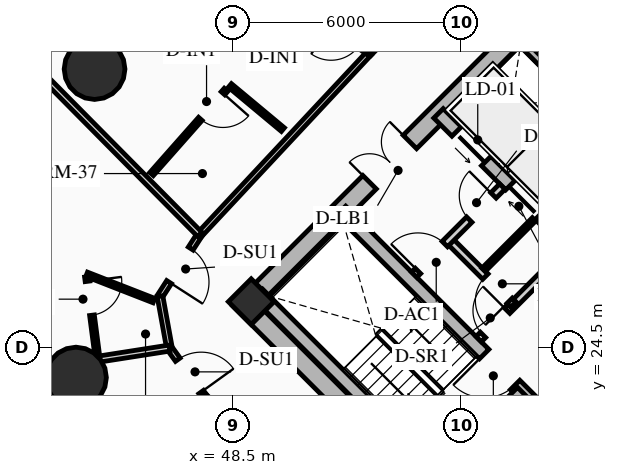
"""IFC4 building model, lengths in metres.
Left out: names, types, materials, properties, quantities, classifications, styles, units other than length and angle.
Written with IfcOpenShell. Run it as: python <this file> out.ifc"""

import sys

from ifc_helpers import new_model, si_unit, direction, frame, frame_2d, origin, origin_2d, place, context, subcontext, project, spatial, rectangle, circle, extrude, source, transform, mapped, element, fill, save


model = new_model("IFC4")
c1 = context("Model", 3, precision=1e-05, world=origin(), true_north=direction((0.0, 1.0)))
c2 = subcontext(c1, "Body", "Model", "MODEL_VIEW")
j1 = project(units=[si_unit("LENGTHUNIT", "METRE"), si_unit("PLANEANGLEUNIT", "RADIAN")], contexts=[c1])
p1 = place(None, origin())
s1 = spatial("IfcSite", under=j1, at=p1, CompositionType="ELEMENT")
p2 = place(p1, origin())
s2 = spatial("IfcBuilding", under=s1, at=p2, CompositionType="ELEMENT")
p3 = place(p2, frame((0.0, 0.0, 51.1)))
s3 = spatial("IfcBuildingStorey", under=s2, at=p3, CompositionType="ELEMENT", Elevation=51.1)
for number, where, z_axis, x_axis in (
    (1, (58.773, 15.661, 0.0), (0.0, 0.0, 1.0), (-0.707, 0.707, 0.0)),
    (2, (66.339, 23.227, 0.0), (0.0, 0.0, 1.0), (-0.707, 0.707, 0.0)),
):
    element("IfcWall", number, at=place(p3, frame(where, z_axis=z_axis, x_axis=x_axis)), inside=s3, PredefinedType="SHEAR", context=c2, shape_type="SweptSolid", body=[
        extrude(rectangle(XDim=14.3, YDim=0.5, at=frame_2d((7.15, 0.0))), origin(), (0.0, 0.0, 1.0), 2.91),
    ])
p4 = place(p3, frame((48.838, 25.596, 0.0), z_axis=(0.0, 0.0, 1.0), x_axis=(0.707106781187, 0.707106781187, 0.0)))
e3 = element("IfcWall", 3, at=p4, inside=s3, PredefinedType="SHEAR", context=c2, shape_type="SweptSolid", body=[
    extrude(rectangle(XDim=10.7, YDim=0.5, at=frame_2d((5.35, 0.0))), origin(), (0.0, 0.0, 1.0), 2.91),
])
m1 = source(origin(), c2, "Body", "SweptSolid", [
    extrude(rectangle(XDim=1.5, YDim=2.02, at=frame_2d((0.75, 1.01))), frame((0.0, 0.26, 0.0), z_axis=(0.0, -1.0, 0.0), x_axis=(1.0, 0.0, 0.0)), (0.0, 0.0, 1.0), 0.52),
])
p5 = place(p4, frame((4.6, 0.0, 0.0)))
e4 = element("IfcOpeningElement", 4, at=p5, cuts=e3, PredefinedType="OPENING", context=c2, shape_type="MappedRepresentation", body=[
    mapped(m1, transform((0.0, 0.0, 0.0), x_axis=(1.0, 0.0, 0.0), y_axis=(0.0, 1.0, 0.0), z_axis=(0.0, 0.0, 1.0), scale=1.0)),
])
p6 = place(p3, frame((61.096, 18.338, 0.0), z_axis=(0.0, 0.0, 1.0), x_axis=(-0.707106781187, 0.707106781187, 0.0)))
e5 = element("IfcWall", 5, at=p6, inside=s3, PredefinedType="SHEAR", context=c2, shape_type="SweptSolid", body=[
    extrude(rectangle(XDim=13.8, YDim=0.35, at=frame_2d((6.9, 0.0))), origin(), (0.0, 0.0, 1.0), 2.91),
])
m2 = source(origin(), c2, "Body", "SweptSolid", [
    extrude(rectangle(XDim=1.1, YDim=2.015, at=frame_2d((0.55, 1.007))), frame((0.0, 0.185, 0.0), z_axis=(0.0, -1.0, 0.0), x_axis=(1.0, 0.0, 0.0)), (0.0, 0.0, 1.0), 0.37),
])
p7 = place(p6, frame((4.9, 0.0, 0.0)))
e6 = element("IfcOpeningElement", 6, at=p7, cuts=e5, PredefinedType="OPENING", context=c2, shape_type="MappedRepresentation", body=[
    mapped(m2, transform((0.0, 0.0, 0.0), x_axis=(1.0, 0.0, 0.0), y_axis=(0.0, 1.0, 0.0), z_axis=(0.0, 0.0, 1.0), scale=1.0)),
])
m3 = source(origin(), c2, "Body", "SweptSolid", [
    extrude(rectangle(XDim=1.15, YDim=2.02, at=frame_2d((0.575, 1.01))), frame((0.0, 0.185, 0.0), z_axis=(0.0, -1.0, 0.0), x_axis=(1.0, 0.0, 0.0)), (0.0, 0.0, 1.0), 0.37),
])
p8 = place(p6, frame((7.32, 0.0, 0.0)))
e7 = element("IfcOpeningElement", 7, at=p8, cuts=e5, PredefinedType="OPENING", context=c2, shape_type="MappedRepresentation", body=[
    mapped(m3, transform((0.0, 0.0, 0.0), x_axis=(1.0, 0.0, 0.0), y_axis=(0.0, 1.0, 0.0), z_axis=(0.0, 0.0, 1.0), scale=1.0)),
])
p9 = place(p3, frame((63.662, 20.904, 0.0), z_axis=(0.0, 0.0, 1.0), x_axis=(-0.707106781187, 0.707106781187, 0.0)))
e8 = element("IfcWall", 8, at=p9, inside=s3, PredefinedType="SHEAR", context=c2, shape_type="SweptSolid", body=[
    extrude(rectangle(XDim=13.8, YDim=0.35, at=frame_2d((6.9, 0.0))), origin(), (0.0, 0.0, 1.0), 2.91),
])
p10 = place(p9, frame((10.025, 0.0, 0.0)))
e9 = element("IfcOpeningElement", 9, at=p10, cuts=e8, PredefinedType="OPENING", context=c2, shape_type="MappedRepresentation", body=[
    mapped(m2, transform((0.0, 0.0, 0.0), x_axis=(1.0, 0.0, 0.0), y_axis=(0.0, 1.0, 0.0), z_axis=(0.0, 0.0, 1.0), scale=1.0)),
])
p11 = place(p9, frame((12.025, 0.0, 0.0)))
e10 = element("IfcOpeningElement", 10, at=p11, cuts=e8, PredefinedType="OPENING", context=c2, shape_type="MappedRepresentation", body=[
    mapped(m2, transform((0.0, 0.0, 0.0), x_axis=(1.0, 0.0, 0.0), y_axis=(0.0, 1.0, 0.0), z_axis=(0.0, 0.0, 1.0), scale=1.0)),
])
p12 = place(p9, frame((5.33, 0.0, 0.0)))
e11 = element("IfcOpeningElement", 11, at=p12, cuts=e8, PredefinedType="OPENING", context=c2, shape_type="MappedRepresentation", body=[
    mapped(m3, transform((0.0, 0.0, 0.0), x_axis=(1.0, 0.0, 0.0), y_axis=(0.0, 1.0, 0.0), z_axis=(0.0, 0.0, 1.0), scale=1.0)),
])
p13 = place(p3, frame((53.922, 21.141, 0.0), z_axis=(0.0, 0.0, 1.0), x_axis=(-0.707106781187, 0.707106781187, 0.0)))
e12 = element("IfcWall", 12, at=p13, inside=s3, PredefinedType="SHEAR", context=c2, shape_type="SweptSolid", body=[
    extrude(rectangle(XDim=6.745, YDim=0.35, at=frame_2d((3.373, 0.0))), origin(), (0.0, 0.0, 1.0), 2.91),
])
p14 = place(p3, frame((53.784, 21.003, 0.0), z_axis=(0.0, 0.0, 1.0), x_axis=(0.707106781187, 0.707106781187, 0.0)))
e13 = element("IfcWall", 13, at=p14, inside=s3, PredefinedType="SHEAR", context=c2, shape_type="SweptSolid", body=[
    extrude(rectangle(XDim=3.285, YDim=0.35, at=frame_2d((1.643, 0.0))), origin(), (0.0, 0.0, 1.0), 2.91),
])
p15 = place(p3, frame((48.976, 25.706, 0.0), z_axis=(0.0, 0.0, 1.0), x_axis=(0.707106781187, 0.707106781187, 0.0)))
e14 = element("IfcColumn", 14, at=p15, inside=s3, PredefinedType="COLUMN", context=c2, shape_type="SweptSolid", body=[
    extrude(rectangle(XDim=0.85, YDim=0.85, at=origin_2d()), origin(), (0.0, 0.0, 1.0), 2.91),
])
for number, where, z_axis, x_axis in (
    (15, (44.854, 31.827, 0.0), (0.0, 0.0, 1.0), (1.0, 0.0, 0.0)),
    (16, (44.365, 23.709, 0.0), (0.0, 0.0, 1.0), (1.0, 0.0, 0.0)),
):
    element("IfcColumn", number, at=place(p3, frame(where, z_axis=z_axis, x_axis=x_axis)), inside=s3, PredefinedType="USERDEFINED", context=c2, shape_type="SweptSolid", body=[
        extrude(circle(Radius=0.8, at=origin_2d()), origin(), (0.0, 0.0, 1.0), 2.91),
    ])
p16 = place(p3, frame((55.615, 29.227, 0.0), z_axis=(0.0, 0.0, 1.0), x_axis=(0.707147878904, 0.70706568108, 0.0)))
e17 = element("IfcWall", 17, at=p16, inside=s3, PredefinedType="SHEAR", context=c2, shape_type="SweptSolid", body=[
    extrude(rectangle(XDim=2.97, YDim=0.2, at=frame_2d((1.485, 0.0))), origin(), (0.0, 0.0, 1.0), 2.91),
])
p17 = place(p3, frame((57.419, 31.2, 0.0), z_axis=(0.0, 0.0, 1.0), x_axis=(-0.707032117043, 0.707181437447, 0.0)))
e18 = element("IfcWall", 18, at=p17, inside=s3, PredefinedType="SHEAR", context=c2, shape_type="SweptSolid", body=[
    extrude(rectangle(XDim=1.635, YDim=0.2, at=frame_2d((0.817, 0.0))), origin(), (0.0, 0.0, 1.0), 2.91),
])
p18 = place(p3, frame((54.961, 24.719, 0.0), z_axis=(0.0, 0.0, 1.0), x_axis=(0.707106781187, 0.707106781187, 0.0)))
e19 = element("IfcWall", 19, at=p18, inside=s3, PredefinedType="PARTITIONING", context=c2, shape_type="SweptSolid", body=[
    extrude(rectangle(XDim=3.28, YDim=0.2, at=frame_2d((1.64, 0.0))), origin(), (0.0, 0.0, 1.0), 2.635),
])
m4 = source(origin(), c2, "Body", "SweptSolid", [
    extrude(rectangle(XDim=0.9, YDim=2.005, at=frame_2d((0.45, 1.002))), frame((0.0, 0.11, 0.0), z_axis=(0.0, -1.0, 0.0), x_axis=(1.0, 0.0, 0.0)), (0.0, 0.0, 1.0), 0.22),
])
p19 = place(p18, frame((0.16, 0.0, 0.0)))
e20 = element("IfcOpeningElement", 20, at=p19, cuts=e19, PredefinedType="OPENING", context=c2, shape_type="MappedRepresentation", body=[
    mapped(m4, transform((0.0, 0.0, 0.0), x_axis=(1.0, 0.0, 0.0), y_axis=(0.0, 1.0, 0.0), z_axis=(0.0, 0.0, 1.0), scale=1.0)),
])
p20 = place(p3, frame((55.874, 25.631, 0.0), z_axis=(0.0, 0.0, 1.0), x_axis=(-0.707157639372, 0.707055919343, 0.0)))
e21 = element("IfcWall", 21, at=p20, inside=s3, PredefinedType="PARTITIONING", context=c2, shape_type="SweptSolid", body=[
    extrude(rectangle(XDim=2.4, YDim=0.2, at=frame_2d((1.2, 0.0))), origin(), (0.0, 0.0, 1.0), 2.635),
])
p21 = place(p20, frame((0.14, 0.0, 0.0)))
e22 = element("IfcOpeningElement", 22, at=p21, cuts=e21, PredefinedType="OPENING", context=c2, shape_type="MappedRepresentation", body=[
    mapped(m4, transform((0.0, 0.0, 0.0), x_axis=(1.0, 0.0, 0.0), y_axis=(0.0, 1.0, 0.0), z_axis=(0.0, 0.0, 1.0), scale=1.0)),
])
p22 = place(p3, frame((53.264, 26.416, 0.0), z_axis=(0.0, 0.0, 1.0), x_axis=(0.707106781187, 0.707106781187, 0.0)))
e23 = element("IfcWall", 23, at=p22, inside=s3, PredefinedType="PARTITIONING", context=c2, shape_type="SweptSolid", body=[
    extrude(rectangle(XDim=3.28, YDim=0.2, at=frame_2d((1.64, 0.0))), origin(), (0.0, 0.0, 1.0), 2.635),
])
m5 = source(origin(), c2, "Body", "SweptSolid", [
    extrude(rectangle(XDim=1.0, YDim=2.015, at=frame_2d((0.5, 1.007))), frame((0.0, 0.11, 0.0), z_axis=(0.0, -1.0, 0.0), x_axis=(1.0, 0.0, 0.0)), (0.0, 0.0, 1.0), 0.22),
])
p23 = place(p22, frame((0.14, 0.0, 0.0)))
e24 = element("IfcOpeningElement", 24, at=p23, cuts=e23, PredefinedType="OPENING", context=c2, shape_type="MappedRepresentation", body=[
    mapped(m5, transform((0.0, 0.0, 0.0), x_axis=(1.0, 0.0, 0.0), y_axis=(0.0, 1.0, 0.0), z_axis=(0.0, 0.0, 1.0), scale=1.0)),
])
p24 = place(p22, frame((2.05, 0.0, 0.0)))
e25 = element("IfcOpeningElement", 25, at=p24, cuts=e23, PredefinedType="OPENING", context=c2, shape_type="MappedRepresentation", body=[
    mapped(m4, transform((0.0, 0.0, 0.0), x_axis=(1.0, 0.0, 0.0), y_axis=(0.0, 1.0, 0.0), z_axis=(0.0, 0.0, 1.0), scale=1.0)),
])
p25 = place(p3, frame((55.089, 26.543, 0.0), z_axis=(0.0, 0.0, 1.0), x_axis=(0.707106781187, 0.707106781187, 0.0)))
e26 = element("IfcWall", 26, at=p25, inside=s3, PredefinedType="PARTITIONING", context=c2, shape_type="SweptSolid", body=[
    extrude(rectangle(XDim=1.88, YDim=0.125, at=frame_2d((0.94, 0.0))), origin(), (0.0, 0.0, 1.0), 2.635),
])
p26 = place(p3, frame((54.461, 34.648, 0.0), z_axis=(0.0, 0.0, 1.0), x_axis=(-0.70403409755, -0.710166170334, 0.0)))
e27 = element("IfcWall", 27, at=p26, inside=s3, PredefinedType="PARTITIONING", context=c2, shape_type="SweptSolid", body=[
    extrude(rectangle(XDim=3.384, YDim=0.15, at=frame_2d((1.692, 0.0))), origin(), (0.0, 0.0, 1.0), 2.159),
])
m6 = source(origin(), c2, "Body", "SweptSolid", [
    extrude(rectangle(XDim=1.05, YDim=2.015, at=frame_2d((0.525, 1.007))), frame((0.0, 0.085, 0.0), z_axis=(0.0, -1.0, 0.0), x_axis=(1.0, 0.0, 0.0)), (0.0, 0.0, 1.0), 0.17),
])
p27 = place(p26, frame((1.691, 0.0, 0.0)))
e28 = element("IfcOpeningElement", 28, at=p27, cuts=e27, PredefinedType="OPENING", context=c2, shape_type="MappedRepresentation", body=[
    mapped(m6, transform((0.0, 0.0, 0.0), x_axis=(1.0, 0.0, 0.0), y_axis=(0.0, 1.0, 0.0), z_axis=(0.0, 0.0, 1.0), scale=1.0)),
])
p28 = place(p3, frame((52.079, 32.244, 0.0), z_axis=(0.0, 0.0, 1.0), x_axis=(-0.682703325574, -0.730695674854, 0.0)))
e29 = element("IfcWall", 29, at=p28, inside=s3, PredefinedType="PARTITIONING", context=c2, shape_type="SweptSolid", body=[
    extrude(rectangle(XDim=6.527, YDim=0.15, at=frame_2d((3.263, 0.0))), origin(), (0.0, 0.0, 1.0), 2.159),
])
p29 = place(p3, frame((47.623, 27.475, 0.0), z_axis=(0.0, 0.0, 1.0), x_axis=(-0.54158041545, -0.840648947898, 0.0)))
e30 = element("IfcWall", 30, at=p29, inside=s3, PredefinedType="PARTITIONING", context=c2, shape_type="SweptSolid", body=[
    extrude(rectangle(XDim=1.934, YDim=0.15, at=frame_2d((0.967, 0.0))), origin(), (0.0, 0.0, 1.0), 2.159),
])
p30 = place(p29, frame((0.442, 0.0, 0.0)))
e31 = element("IfcOpeningElement", 31, at=p30, cuts=e30, PredefinedType="OPENING", context=c2, shape_type="MappedRepresentation", body=[
    mapped(m6, transform((0.0, 0.0, 0.0), x_axis=(1.0, 0.0, 0.0), y_axis=(0.0, 1.0, 0.0), z_axis=(0.0, 0.0, 1.0), scale=1.0)),
])
p31 = place(p3, frame((46.576, 25.85, 0.0), z_axis=(0.0, 0.0, 1.0), x_axis=(0.178962865041, -0.983855829345, 0.0)))
e32 = element("IfcWall", 32, at=p31, inside=s3, PredefinedType="PARTITIONING", context=c2, shape_type="SweptSolid", body=[
    extrude(rectangle(XDim=1.387, YDim=0.15, at=frame_2d((0.694, 0.0))), origin(), (0.0, 0.0, 1.0), 2.159),
])
p32 = place(p3, frame((46.824, 24.485, 0.0), z_axis=(0.0, 0.0, 1.0), x_axis=(0.584890953925, -0.811111935565, 0.0)))
e33 = element("IfcWall", 33, at=p32, inside=s3, PredefinedType="PARTITIONING", context=c2, shape_type="SweptSolid", body=[
    extrude(rectangle(XDim=1.547, YDim=0.15, at=frame_2d((0.773, 0.0))), origin(), (0.0, 0.0, 1.0), 2.205),
])
p33 = place(p32, frame((0.377, 0.0, 0.0)))
e34 = element("IfcOpeningElement", 34, at=p33, cuts=e33, PredefinedType="OPENING", context=c2, shape_type="MappedRepresentation", body=[
    mapped(m6, transform((0.0, 0.0, 0.0), x_axis=(1.0, 0.0, 0.0), y_axis=(0.0, 1.0, 0.0), z_axis=(0.0, 0.0, 1.0), scale=1.0)),
])
p34 = place(p3, frame((47.729, 23.23, 0.0), z_axis=(0.0, 0.0, 1.0), x_axis=(0.696119834292, -0.717925606386, 0.0)))
e35 = element("IfcWall", 35, at=p34, inside=s3, PredefinedType="PARTITIONING", context=c2, shape_type="SweptSolid", body=[
    extrude(rectangle(XDim=6.012, YDim=0.15, at=frame_2d((3.006, 0.0))), origin(), (0.0, 0.0, 1.0), 2.635),
])
p35 = place(p3, frame((47.623, 27.475, 0.0), z_axis=(0.0, 0.0, 1.0), x_axis=(-0.703512438021, 0.71068294587, 0.0)))
e36 = element("IfcWall", 36, at=p35, inside=s3, PredefinedType="PARTITIONING", context=c2, shape_type="SweptSolid", body=[
    extrude(rectangle(XDim=9.125, YDim=0.16, at=frame_2d((4.562, 0.0))), origin(), (0.0, 0.0, 1.0), 2.073),
])
p36 = place(p3, frame((46.824, 24.485, 0.0), z_axis=(0.0, 0.0, 1.0), x_axis=(-0.988003730645, -0.154430010784, 0.0)))
e37 = element("IfcWall", 37, at=p36, inside=s3, PredefinedType="PARTITIONING", context=c2, shape_type="SweptSolid", body=[
    extrude(rectangle(XDim=6.308, YDim=0.16, at=frame_2d((3.154, 0.0))), origin(), (0.0, 0.0, 1.0), 2.073),
])
p37 = place(p3, frame((52.079, 32.244, 0.0), z_axis=(0.0, 0.0, 1.0), x_axis=(-0.813888867537, 0.581020577346, 0.0)))
e38 = element("IfcWall", 38, at=p37, inside=s3, PredefinedType="PARTITIONING", context=c2, shape_type="SweptSolid", body=[
    extrude(rectangle(XDim=9.977, YDim=0.125, at=frame_2d((4.988, 0.0))), origin(), (0.0, 0.0, 1.0), 2.073),
])
m7 = source(origin(), c2, "Body", "SweptSolid", [
    extrude(rectangle(XDim=0.9, YDim=2.005, at=frame_2d((0.45, 1.002))), frame((0.0, 0.073, 0.0), z_axis=(0.0, -1.0, 0.0), x_axis=(1.0, 0.0, 0.0)), (0.0, 0.0, 1.0), 0.145),
])
p38 = place(p37, frame((0.33, 0.0, 0.0)))
e39 = element("IfcOpeningElement", 39, at=p38, cuts=e38, PredefinedType="OPENING", context=c2, shape_type="MappedRepresentation", body=[
    mapped(m7, transform((0.0, 0.0, 0.0), x_axis=(1.0, 0.0, 0.0), y_axis=(0.0, 1.0, 0.0), z_axis=(0.0, 0.0, 1.0), scale=1.0)),
])
p39 = place(p3, frame((49.809, 30.234, 0.0), z_axis=(0.0, 0.0, 1.0), x_axis=(-0.76830950514, 0.640078514177, 0.0)))
e40 = element("IfcWall", 40, at=p39, inside=s3, PredefinedType="PARTITIONING", context=c2, shape_type="SweptSolid", body=[
    extrude(rectangle(XDim=1.814, YDim=0.125, at=frame_2d((0.907, 0.0))), origin(), (0.0, 0.0, 1.0), 2.635),
])
p40 = place(p3, frame((48.313, 31.28, 0.0), z_axis=(0.0, 0.0, 1.0), x_axis=(-0.662230126621, -0.749300513409, 0.0)))
e41 = element("IfcWall", 41, at=p40, inside=s3, PredefinedType="PARTITIONING", context=c2, shape_type="SweptSolid", body=[
    extrude(rectangle(XDim=2.958, YDim=0.125, at=frame_2d((1.479, 0.0))), origin(), (0.0, 0.0, 1.0), 2.159),
])
p41 = place(p40, frame((0.12, 0.0, 0.0)))
e42 = element("IfcOpeningElement", 42, at=p41, cuts=e41, PredefinedType="OPENING", context=c2, shape_type="MappedRepresentation", body=[
    mapped(m7, transform((0.0, 0.0, 0.0), x_axis=(1.0, 0.0, 0.0), y_axis=(0.0, 1.0, 0.0), z_axis=(0.0, 0.0, 1.0), scale=1.0)),
])
p42 = place(p3, frame((46.416, 25.735, 0.0), z_axis=(0.0, 0.0, 1.0), x_axis=(-0.931623241188, 0.363425558373, 0.0)))
e43 = element("IfcWall", 43, at=p42, inside=s3, PredefinedType="PARTITIONING", context=c2, shape_type="SweptSolid", body=[
    extrude(rectangle(XDim=1.9, YDim=0.125, at=frame_2d((0.95, 0.0))), origin(), (0.0, 0.0, 1.0), 2.635),
])
p43 = place(p3, frame((44.654, 26.361, 0.0), z_axis=(0.0, 0.0, 1.0), x_axis=(0.129433729192, -0.991588074629, 0.0)))
e44 = element("IfcWall", 44, at=p43, inside=s3, PredefinedType="PARTITIONING", context=c2, shape_type="SweptSolid", body=[
    extrude(rectangle(XDim=2.097, YDim=0.125, at=frame_2d((1.049, 0.0))), origin(), (0.0, 0.0, 1.0), 2.073),
])
p44 = place(p43, frame((0.12, 0.0, 0.0)))
e45 = element("IfcOpeningElement", 45, at=p44, cuts=e44, PredefinedType="OPENING", context=c2, shape_type="MappedRepresentation", body=[
    mapped(m7, transform((0.0, 0.0, 0.0), x_axis=(1.0, 0.0, 0.0), y_axis=(0.0, 1.0, 0.0), z_axis=(0.0, 0.0, 1.0), scale=1.0)),
])
m8 = source(origin(), c2, "Body", "SweptSolid", [
    extrude(rectangle(XDim=1.1, YDim=2.015, at=frame_2d((0.55, 1.007))), frame((0.0, 0.025, 0.0), z_axis=(0.0, -1.0, 0.0), x_axis=(1.0, 0.0, 0.0)), (0.0, 0.0, 1.0), 0.05),
])
p45 = place(p10, origin())
e46 = element("IfcDoor", 46, at=p45, inside=s3, OperationType="SLIDING_TO_RIGHT", PredefinedType="DOOR", context=c2, shape_type="MappedRepresentation", body=[
    mapped(m8, transform((0.0, 0.0, 0.0), x_axis=(1.0, 0.0, 0.0), y_axis=(0.0, 1.0, 0.0), z_axis=(0.0, 0.0, 1.0), scale=1.0)),
])
fill(e9, e46)
p46 = place(p11, origin())
e47 = element("IfcDoor", 47, at=p46, inside=s3, OperationType="SLIDING_TO_LEFT", PredefinedType="DOOR", context=c2, shape_type="MappedRepresentation", body=[
    mapped(m8, transform((0.0, 0.0, 0.0), x_axis=(1.0, 0.0, 0.0), y_axis=(0.0, 1.0, 0.0), z_axis=(0.0, 0.0, 1.0), scale=1.0)),
])
fill(e10, e47)
m9 = source(origin(), c2, "Body", "SweptSolid", [
    extrude(rectangle(XDim=1.15, YDim=2.02, at=frame_2d((0.575, 1.01))), frame((0.0, 0.025, 0.0), z_axis=(0.0, -1.0, 0.0), x_axis=(1.0, 0.0, 0.0)), (0.0, 0.0, 1.0), 0.05),
])
p47 = place(p8, origin())
e48 = element("IfcDoor", 48, at=p47, inside=s3, OperationType="SINGLE_SWING_RIGHT", PredefinedType="DOOR", context=c2, shape_type="MappedRepresentation", body=[
    mapped(m9, transform((0.0, 0.0, 0.0), x_axis=(1.0, 0.0, 0.0), y_axis=(0.0, 1.0, 0.0), z_axis=(0.0, 0.0, 1.0), scale=1.0)),
])
fill(e7, e48)
m10 = source(origin(), c2, "Body", "SweptSolid", [
    extrude(rectangle(XDim=1.5, YDim=2.02, at=frame_2d((0.75, 1.01))), frame((0.0, 0.025, 0.0), z_axis=(0.0, -1.0, 0.0), x_axis=(1.0, 0.0, 0.0)), (0.0, 0.0, 1.0), 0.05),
])
p48 = place(p5, origin())
e49 = element("IfcDoor", 49, at=p48, inside=s3, OperationType="DOUBLE_DOOR_SINGLE_SWING", PredefinedType="DOOR", context=c2, shape_type="MappedRepresentation", body=[
    mapped(m10, transform((0.0, 0.0, 0.0), x_axis=(1.0, 0.0, 0.0), y_axis=(0.0, 1.0, 0.0), z_axis=(0.0, 0.0, 1.0), scale=1.0)),
])
fill(e4, e49)
m11 = source(origin(), c2, "Body", "SweptSolid", [
    extrude(rectangle(XDim=0.9, YDim=2.005, at=frame_2d((0.45, 1.002))), frame((0.0, 0.025, 0.0), z_axis=(0.0, -1.0, 0.0), x_axis=(1.0, 0.0, 0.0)), (0.0, 0.0, 1.0), 0.05),
])
p49 = place(p19, origin())
e50 = element("IfcDoor", 50, at=p49, inside=s3, OperationType="SINGLE_SWING_RIGHT", PredefinedType="DOOR", context=c2, shape_type="MappedRepresentation", body=[
    mapped(m11, transform((0.0, 0.0, 0.0), x_axis=(1.0, 0.0, 0.0), y_axis=(0.0, 1.0, 0.0), z_axis=(0.0, 0.0, 1.0), scale=1.0)),
])
fill(e20, e50)
m12 = source(origin(), c2, "Body", "SweptSolid", [
    extrude(rectangle(XDim=1.0, YDim=2.015, at=frame_2d((0.5, 1.007))), frame((0.0, 0.025, 0.0), z_axis=(0.0, -1.0, 0.0), x_axis=(1.0, 0.0, 0.0)), (0.0, 0.0, 1.0), 0.05),
])
p50 = place(p23, origin())
e51 = element("IfcDoor", 51, at=p50, inside=s3, OperationType="SINGLE_SWING_LEFT", PredefinedType="DOOR", context=c2, shape_type="MappedRepresentation", body=[
    mapped(m12, transform((0.0, 0.0, 0.0), x_axis=(1.0, 0.0, 0.0), y_axis=(0.0, 1.0, 0.0), z_axis=(0.0, 0.0, 1.0), scale=1.0)),
])
fill(e24, e51)
p51 = place(p21, origin())
e52 = element("IfcDoor", 52, at=p51, inside=s3, OperationType="SINGLE_SWING_LEFT", PredefinedType="DOOR", context=c2, shape_type="MappedRepresentation", body=[
    mapped(m11, transform((0.0, 0.0, 0.0), x_axis=(1.0, 0.0, 0.0), y_axis=(0.0, 1.0, 0.0), z_axis=(0.0, 0.0, 1.0), scale=1.0)),
])
fill(e22, e52)
p52 = place(p24, origin())
e53 = element("IfcDoor", 53, at=p52, inside=s3, OperationType="SINGLE_SWING_RIGHT", PredefinedType="DOOR", context=c2, shape_type="MappedRepresentation", body=[
    mapped(m11, transform((0.0, 0.0, 0.0), x_axis=(1.0, 0.0, 0.0), y_axis=(0.0, 1.0, 0.0), z_axis=(0.0, 0.0, 1.0), scale=1.0)),
])
fill(e25, e53)
p53 = place(p41, origin())
e54 = element("IfcDoor", 54, at=p53, inside=s3, OperationType="SINGLE_SWING_LEFT", PredefinedType="DOOR", context=c2, shape_type="MappedRepresentation", body=[
    mapped(m11, transform((0.0, 0.0, 0.0), x_axis=(1.0, 0.0, 0.0), y_axis=(0.0, 1.0, 0.0), z_axis=(0.0, 0.0, 1.0), scale=1.0)),
])
fill(e42, e54)
m13 = source(origin(), c2, "Body", "SweptSolid", [
    extrude(rectangle(XDim=1.05, YDim=2.015, at=frame_2d((0.525, 1.007))), frame((0.0, 0.025, 0.0), z_axis=(0.0, -1.0, 0.0), x_axis=(1.0, 0.0, 0.0)), (0.0, 0.0, 1.0), 0.05),
])
p54 = place(p30, origin())
e55 = element("IfcDoor", 55, at=p54, inside=s3, OperationType="SINGLE_SWING_RIGHT", PredefinedType="DOOR", context=c2, shape_type="MappedRepresentation", body=[
    mapped(m13, transform((0.0, 0.0, 0.0), x_axis=(1.0, 0.0, 0.0), y_axis=(0.0, 1.0, 0.0), z_axis=(0.0, 0.0, 1.0), scale=1.0)),
])
fill(e31, e55)
p55 = place(p44, origin())
e56 = element("IfcDoor", 56, at=p55, inside=s3, OperationType="SINGLE_SWING_LEFT", PredefinedType="DOOR", context=c2, shape_type="MappedRepresentation", body=[
    mapped(m11, transform((0.0, 0.0, 0.0), x_axis=(1.0, 0.0, 0.0), y_axis=(0.0, 1.0, 0.0), z_axis=(0.0, 0.0, 1.0), scale=1.0)),
])
fill(e45, e56)
p56 = place(p33, origin())
e57 = element("IfcDoor", 57, at=p56, inside=s3, OperationType="SINGLE_SWING_RIGHT", PredefinedType="DOOR", context=c2, shape_type="MappedRepresentation", body=[
    mapped(m13, transform((0.0, 0.0, 0.0), x_axis=(1.0, 0.0, 0.0), y_axis=(0.0, 1.0, 0.0), z_axis=(0.0, 0.0, 1.0), scale=1.0)),
])
fill(e34, e57)
save(model, sys.argv[1])
